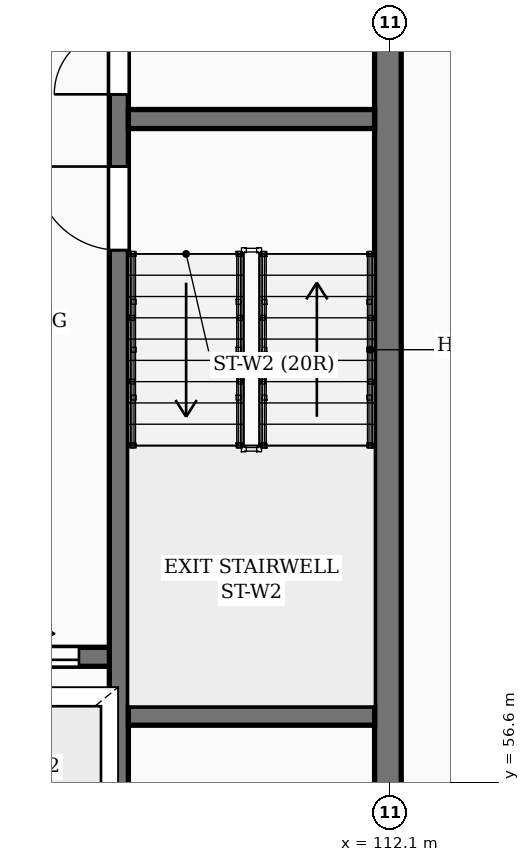
"""IFC4 building model, lengths in metres.
Left out: names, types, materials, properties, quantities, classifications, styles, units other than length and angle.
Written with IfcOpenShell. Run it as: python <this file> out.ifc"""

import sys

from ifc_helpers import new_model, si_unit, direction, frame, frame_2d, origin, place, context, subcontext, project, spatial, rectangle, extrude, element, fill, save


model = new_model("IFC4")
c1 = context("Model", 3, precision=1e-05, world=origin(), true_north=direction((0.0, 1.0)))
c2 = subcontext(c1, "Body", "Model", "MODEL_VIEW")
j1 = project(units=[si_unit("LENGTHUNIT", "METRE"), si_unit("PLANEANGLEUNIT", "RADIAN")], contexts=[c1])
p1 = place(None, origin())
s1 = spatial("IfcSite", under=j1, at=p1, CompositionType="ELEMENT")
p2 = place(p1, origin())
s2 = spatial("IfcBuilding", under=s1, at=p2, CompositionType="ELEMENT")
p3 = place(p2, frame((0.0, 0.0, -10.8)))
s3 = spatial("IfcBuildingStorey", under=s2, at=p3, CompositionType="ELEMENT", Elevation=-10.8)
p4 = place(p3, frame((112.075, 55.375, 0.0), z_axis=(0.0, 0.0, 1.0), x_axis=(0.0, 1.0, 0.0)))
e1 = element("IfcWall", 1, at=p4, inside=s3, PredefinedType="SHEAR", context=c2, shape_type="SweptSolid", body=[
    extrude(rectangle(XDim=11.65, YDim=0.35, at=frame_2d((5.825, 0.0))), origin(), (0.0, 0.0, 1.0), 3.6),
])
p5 = place(p3, frame((106.22, 58.25, 0.0), z_axis=(0.0, 0.0, 1.0), x_axis=(1.0, 0.0, 0.0)))
e2 = element("IfcWall", 2, at=p5, inside=s3, PredefinedType="SHEAR", context=c2, shape_type="SweptSolid", body=[
    extrude(rectangle(XDim=2.46, YDim=0.25, at=frame_2d((1.23, 0.0))), origin(), (0.0, 0.0, 1.0), 3.6),
])
p6 = place(p5, frame((0.67, 0.0, 0.0)))
e3 = element("IfcOpeningElement", 3, at=p6, cuts=e2, PredefinedType="OPENING", context=c2, shape_type="SweptSolid", body=[
    extrude(rectangle(XDim=1.12, YDim=2.12, at=frame_2d((0.56, 1.06))), frame((0.0, 0.135, 0.0), z_axis=(0.0, -1.0, 0.0), x_axis=(1.0, 0.0, 0.0)), (0.0, 0.0, 1.0), 0.27),
])
p7 = place(p3, frame((108.535, 55.4, 0.0), z_axis=(0.0, 0.0, 1.0), x_axis=(0.0, 1.0, 0.0)))
e4 = element("IfcWall", 4, at=p7, inside=s3, PredefinedType="SHEAR", context=c2, shape_type="SweptSolid", body=[
    extrude(rectangle(XDim=11.6, YDim=0.25, at=frame_2d((5.8, 0.0))), origin(), (0.0, 0.0, 1.0), 3.6),
])
p8 = place(p7, frame((8.2, 0.0, 0.0)))
e5 = element("IfcOpeningElement", 5, at=p8, cuts=e4, PredefinedType="OPENING", context=c2, shape_type="SweptSolid", body=[
    extrude(rectangle(XDim=1.1, YDim=2.1, at=frame_2d((0.55, 1.05))), frame((0.0, 0.135, 0.0), z_axis=(0.0, -1.0, 0.0), x_axis=(1.0, 0.0, 0.0)), (0.0, 0.0, 1.0), 0.27),
])
p9 = place(p7, frame((10.25, 0.0, 0.0)))
e6 = element("IfcOpeningElement", 6, at=p9, cuts=e4, PredefinedType="OPENING", context=c2, shape_type="SweptSolid", body=[
    extrude(rectangle(XDim=0.85, YDim=2.05, at=frame_2d((0.425, 1.025))), frame((0.0, 0.135, 0.0), z_axis=(0.0, -1.0, 0.0), x_axis=(1.0, 0.0, 0.0)), (0.0, 0.0, 1.0), 0.27),
])
for number, where, z_axis, x_axis in (
    (7, (108.66, 57.475, 0.0), (0.0, 0.0, 1.0), (1.0, 0.0, 0.0)),
    (8, (108.66, 65.325, 0.0), (0.0, 0.0, 1.0), (1.0, 0.0, 0.0)),
):
    element("IfcWall", number, at=place(p3, frame(where, z_axis=z_axis, x_axis=x_axis)), inside=s3, PredefinedType="SHEAR", context=c2, shape_type="SweptSolid", body=[
        extrude(rectangle(XDim=3.24, YDim=0.25, at=frame_2d((1.62, 0.0))), origin(), (0.0, 0.0, 1.0), 3.6),
    ])
p10 = place(p6, origin())
e9 = element("IfcDoor", 9, at=p10, inside=s3, OperationType="SLIDING_TO_RIGHT", PredefinedType="DOOR", context=c2, shape_type="SweptSolid", body=[
    extrude(rectangle(XDim=1.12, YDim=2.12, at=frame_2d((0.56, 1.06))), frame((0.0, 0.025, 0.0), z_axis=(0.0, -1.0, 0.0), x_axis=(1.0, 0.0, 0.0)), (0.0, 0.0, 1.0), 0.05),
])
fill(e3, e9)
p11 = place(p8, origin())
e10 = element("IfcDoor", 10, at=p11, inside=s3, OperationType="SINGLE_SWING_RIGHT", PredefinedType="DOOR", context=c2, shape_type="SweptSolid", body=[
    extrude(rectangle(XDim=1.1, YDim=2.1, at=frame_2d((0.55, 1.05))), frame((0.0, 0.025, 0.0), z_axis=(0.0, -1.0, 0.0), x_axis=(1.0, 0.0, 0.0)), (0.0, 0.0, 1.0), 0.05),
])
fill(e5, e10)
p12 = place(p9, origin())
e11 = element("IfcDoor", 11, at=p12, inside=s3, OperationType="SINGLE_SWING_LEFT", PredefinedType="DOOR", context=c2, shape_type="SweptSolid", body=[
    extrude(rectangle(XDim=0.85, YDim=2.05, at=frame_2d((0.425, 1.025))), frame((0.0, 0.025, 0.0), z_axis=(0.0, -1.0, 0.0), x_axis=(1.0, 0.0, 0.0)), (0.0, 0.0, 1.0), 0.05),
])
fill(e6, e11)
save(model, sys.argv[1])
